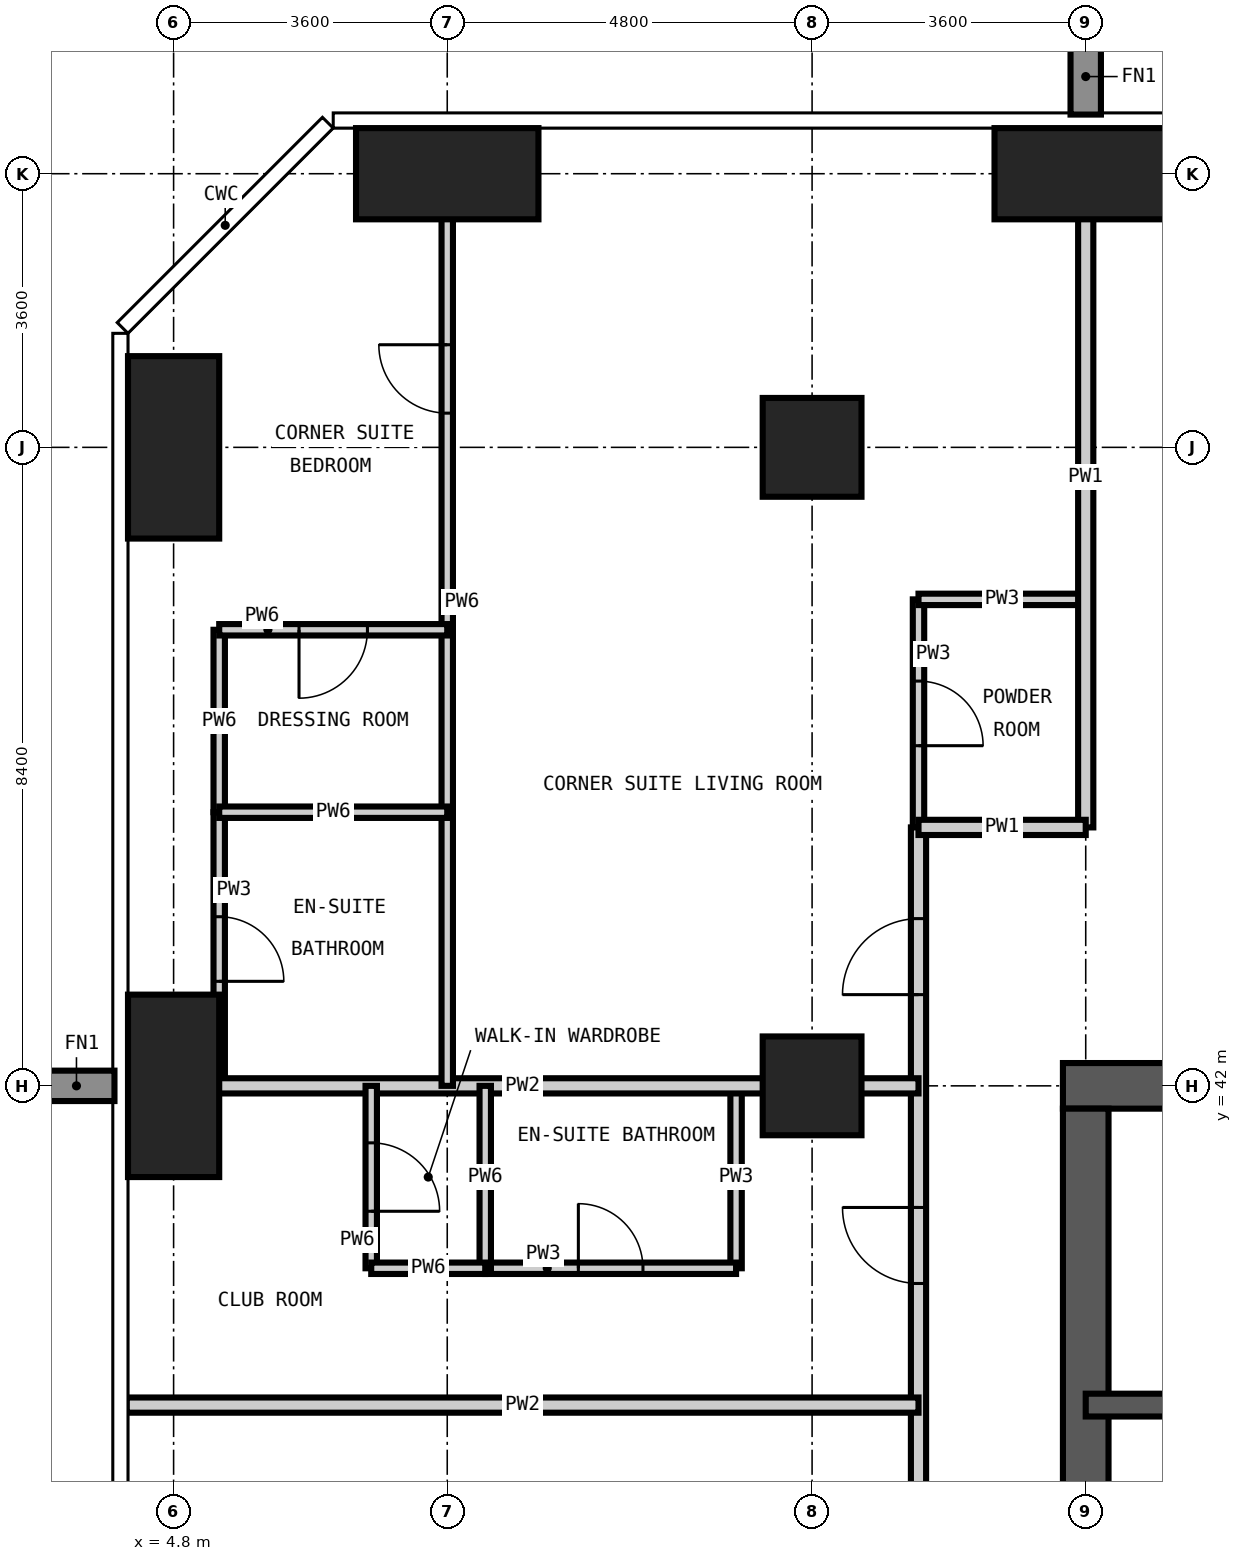
"""IFC4 building model, lengths in metres.
Left out: names, types, materials, properties, quantities, classifications, styles, units other than length and angle.
Written with IfcOpenShell. Run it as: python <this file> out.ifc"""

import sys

from ifc_helpers import new_model, si_unit, direction, frame, frame_2d, origin, origin_2d, place, context, subcontext, project, spatial, rectangle, extrude, element, fill, save


model = new_model("IFC4")
c1 = context("Model", 3, precision=1e-05, world=origin(), true_north=direction((0.0, 1.0)))
c2 = subcontext(c1, "Body", "Model", "MODEL_VIEW")
j1 = project(units=[si_unit("LENGTHUNIT", "METRE"), si_unit("PLANEANGLEUNIT", "RADIAN")], contexts=[c1])
p1 = place(None, origin())
s1 = spatial("IfcSite", under=j1, at=p1, CompositionType="ELEMENT")
p2 = place(p1, origin())
s2 = spatial("IfcBuilding", under=s1, at=p2, CompositionType="ELEMENT")
p3 = place(p2, frame((0.0, 0.0, 180.6)))
s3 = spatial("IfcBuildingStorey", under=s2, at=p3, CompositionType="ELEMENT", Elevation=180.6)
for number, where, z_axis, x_axis in (
    (1, (4.8, 42.0, -0.35), (0.0, 0.0, 1.0), (1.0, 0.0, 0.0)),
    (2, (4.8, 50.4, -0.35), (0.0, 0.0, 1.0), (1.0, 0.0, 0.0)),
):
    element("IfcColumn", number, at=place(p3, frame(where, z_axis=z_axis, x_axis=x_axis)), inside=s3, PredefinedType="COLUMN", context=c2, shape_type="SweptSolid", body=[
        extrude(rectangle(XDim=1.2, YDim=2.4, at=origin_2d()), origin(), (0.0, 0.0, 1.0), 3.6),
    ])
p4 = place(p3, frame((8.4, 54.0, -0.35), z_axis=(0.0, 0.0, 1.0), x_axis=(1.0, 0.0, 0.0)))
e3 = element("IfcColumn", 3, at=p4, inside=s3, PredefinedType="COLUMN", context=c2, shape_type="SweptSolid", body=[
    extrude(rectangle(XDim=2.4, YDim=1.2, at=origin_2d()), origin(), (0.0, 0.0, 1.0), 3.6),
])
for number, where, z_axis, x_axis in (
    (4, (13.2, 42.0, -0.35), (0.0, 0.0, 1.0), (1.0, 0.0, 0.0)),
    (5, (13.2, 50.4, -0.35), (0.0, 0.0, 1.0), (1.0, 0.0, 0.0)),
):
    element("IfcColumn", number, at=place(p3, frame(where, z_axis=z_axis, x_axis=x_axis)), inside=s3, PredefinedType="COLUMN", context=c2, shape_type="SweptSolid", body=[
        extrude(rectangle(XDim=1.3, YDim=1.3, at=origin_2d()), origin(), (0.0, 0.0, 1.0), 3.6),
    ])
p5 = place(p3, frame((16.8, 54.0, -0.35), z_axis=(0.0, 0.0, 1.0), x_axis=(1.0, 0.0, 0.0)))
e6 = element("IfcColumn", 6, at=p5, inside=s3, PredefinedType="COLUMN", context=c2, shape_type="SweptSolid", body=[
    extrude(rectangle(XDim=2.4, YDim=1.2, at=origin_2d()), origin(), (0.0, 0.0, 1.0), 3.6),
])
p6 = place(p3, frame((42.3, 42.0, -0.35), z_axis=(0.0, 0.0, 1.0), x_axis=(-1.0, 0.0, 0.0)))
e7 = element("IfcWall", 7, at=p6, inside=s3, PredefinedType="SHEAR", context=c2, shape_type="SweptSolid", body=[
    extrude(rectangle(XDim=25.8, YDim=0.6, at=frame_2d((12.9, 0.0))), origin(), (0.0, 0.0, 1.0), 3.6),
])
p7 = place(p6, frame((20.8, 0.0, 0.35)))
e8 = element("IfcOpeningElement", 8, at=p7, cuts=e7, PredefinedType="OPENING", context=c2, shape_type="SweptSolid", body=[
    extrude(rectangle(XDim=1.0, YDim=2.1, at=frame_2d((0.5, 1.05))), frame((0.0, 0.31, 0.0), z_axis=(0.0, -1.0, 0.0), x_axis=(1.0, 0.0, 0.0)), (0.0, 0.0, 1.0), 0.62),
])
p8 = place(p6, frame((10.2, 0.0, 0.35)))
e9 = element("IfcOpeningElement", 9, at=p8, cuts=e7, PredefinedType="OPENING", context=c2, shape_type="SweptSolid", body=[
    extrude(rectangle(XDim=1.2, YDim=2.2, at=frame_2d((0.6, 1.1))), frame((0.0, 0.31, 0.0), z_axis=(0.0, -1.0, 0.0), x_axis=(1.0, 0.0, 0.0)), (0.0, 0.0, 1.0), 0.62),
])
p9 = place(p3, frame((16.8, 41.7, -0.35), z_axis=(0.0, 0.0, 1.0), x_axis=(0.0, -1.0, 0.0)))
e10 = element("IfcWall", 10, at=p9, inside=s3, PredefinedType="SHEAR", context=c2, shape_type="SweptSolid", body=[
    extrude(rectangle(XDim=24.6, YDim=0.6, at=frame_2d((12.3, 0.0))), origin(), (0.0, 0.0, 1.0), 3.6),
])
p10 = place(p9, frame((11.4, 0.0, 0.35)))
e11 = element("IfcOpeningElement", 11, at=p10, cuts=e10, PredefinedType="OPENING", context=c2, shape_type="SweptSolid", body=[
    extrude(rectangle(XDim=1.8, YDim=2.2, at=frame_2d((0.9, 1.1))), frame((0.0, 0.31, 0.0), z_axis=(0.0, -1.0, 0.0), x_axis=(1.0, 0.0, 0.0)), (0.0, 0.0, 1.0), 0.62),
])
p11 = place(p9, frame((20.2, 0.0, 0.35)))
e12 = element("IfcOpeningElement", 12, at=p11, cuts=e10, PredefinedType="OPENING", context=c2, shape_type="SweptSolid", body=[
    extrude(rectangle(XDim=1.0, YDim=2.1, at=frame_2d((0.5, 1.05))), frame((0.0, 0.31, 0.0), z_axis=(0.0, -1.0, 0.0), x_axis=(1.0, 0.0, 0.0)), (0.0, 0.0, 1.0), 0.62),
])
p12 = place(p9, frame((5.5, 0.0, 0.35)))
e13 = element("IfcOpeningElement", 13, at=p12, cuts=e10, PredefinedType="OPENING", context=c2, shape_type="SweptSolid", body=[
    extrude(rectangle(XDim=1.0, YDim=2.1, at=frame_2d((0.5, 1.05))), frame((0.0, 0.31, 0.0), z_axis=(0.0, -1.0, 0.0), x_axis=(1.0, 0.0, 0.0)), (0.0, 0.0, 1.0), 0.62),
])
p13 = place(p3, frame((16.8, 37.8, -0.35), z_axis=(0.0, 0.0, 1.0), x_axis=(1.0, 0.0, 0.0)))
e14 = element("IfcWall", 14, at=p13, inside=s3, PredefinedType="SHEAR", context=c2, shape_type="SweptSolid", body=[
    extrude(rectangle(XDim=8.4, YDim=0.3, at=frame_2d((4.2, 0.0))), origin(), (0.0, 0.0, 1.0), 3.6),
])
p14 = place(p3, frame((5.4, 42.0, 0.0), z_axis=(0.0, 0.0, 1.0), x_axis=(0.0, 1.0, 0.0)))
e15 = element("IfcWall", 15, at=p14, inside=s3, PredefinedType="PARTITIONING", context=c2, shape_type="SweptSolid", body=[
    extrude(rectangle(XDim=3.6, YDim=0.15, at=frame_2d((1.8, 0.0))), origin(), (0.0, 0.0, 1.0), 3.25),
])
p15 = place(p14, frame((1.375, 0.0, 0.0)))
e16 = element("IfcOpeningElement", 16, at=p15, cuts=e15, PredefinedType="OPENING", context=c2, shape_type="SweptSolid", body=[
    extrude(rectangle(XDim=0.85, YDim=2.1, at=frame_2d((0.425, 1.05))), frame((0.0, 0.085, 0.0), z_axis=(0.0, -1.0, 0.0), x_axis=(1.0, 0.0, 0.0)), (0.0, 0.0, 1.0), 0.17),
])
p16 = place(p3, frame((12.2, 39.6, 0.0), z_axis=(0.0, 0.0, 1.0), x_axis=(0.0, 1.0, 0.0)))
e17 = element("IfcWall", 17, at=p16, inside=s3, PredefinedType="PARTITIONING", context=c2, shape_type="SweptSolid", body=[
    extrude(rectangle(XDim=2.4, YDim=0.15, at=frame_2d((1.2, 0.0))), origin(), (0.0, 0.0, 1.0), 3.25),
])
p17 = place(p3, frame((14.6, 45.4, 0.0), z_axis=(0.0, 0.0, 1.0), x_axis=(0.0, 1.0, 0.0)))
e18 = element("IfcWall", 18, at=p17, inside=s3, PredefinedType="PARTITIONING", context=c2, shape_type="SweptSolid", body=[
    extrude(rectangle(XDim=3.0, YDim=0.15, at=frame_2d((1.5, 0.0))), origin(), (0.0, 0.0, 1.0), 3.25),
])
p18 = place(p17, frame((1.075, 0.0, 0.0)))
e19 = element("IfcOpeningElement", 19, at=p18, cuts=e18, PredefinedType="OPENING", context=c2, shape_type="SweptSolid", body=[
    extrude(rectangle(XDim=0.85, YDim=2.1, at=frame_2d((0.425, 1.05))), frame((0.0, 0.085, 0.0), z_axis=(0.0, -1.0, 0.0), x_axis=(1.0, 0.0, 0.0)), (0.0, 0.0, 1.0), 0.17),
])
p19 = place(p3, frame((8.9, 39.6, 0.0), z_axis=(0.0, 0.0, 1.0), x_axis=(1.0, 0.0, 0.0)))
e20 = element("IfcWall", 20, at=p19, inside=s3, PredefinedType="PARTITIONING", context=c2, shape_type="SweptSolid", body=[
    extrude(rectangle(XDim=3.3, YDim=0.15, at=frame_2d((1.65, 0.0))), origin(), (0.0, 0.0, 1.0), 3.25),
])
p20 = place(p19, frame((1.225, 0.0, 0.0)))
e21 = element("IfcOpeningElement", 21, at=p20, cuts=e20, PredefinedType="OPENING", context=c2, shape_type="SweptSolid", body=[
    extrude(rectangle(XDim=0.85, YDim=2.1, at=frame_2d((0.425, 1.05))), frame((0.0, 0.085, 0.0), z_axis=(0.0, -1.0, 0.0), x_axis=(1.0, 0.0, 0.0)), (0.0, 0.0, 1.0), 0.17),
])
p21 = place(p3, frame((14.6, 48.4, 0.0), z_axis=(0.0, 0.0, 1.0), x_axis=(1.0, 0.0, 0.0)))
e22 = element("IfcWall", 22, at=p21, inside=s3, PredefinedType="PARTITIONING", context=c2, shape_type="SweptSolid", body=[
    extrude(rectangle(XDim=2.2, YDim=0.15, at=frame_2d((1.1, 0.0))), origin(), (0.0, 0.0, 1.0), 3.25),
])
p22 = place(p3, frame((14.6, 14.6, 0.0), z_axis=(0.0, 0.0, 1.0), x_axis=(0.0, 1.0, 0.0)))
e23 = element("IfcWall", 23, at=p22, inside=s3, PredefinedType="PARTITIONING", context=c2, shape_type="SweptSolid", body=[
    extrude(rectangle(XDim=30.8, YDim=0.2, at=frame_2d((15.4, 0.0))), origin(), (0.0, 0.0, 1.0), 3.25),
])
p23 = place(p22, frame((5.9, 0.0, 0.0)))
e24 = element("IfcOpeningElement", 24, at=p23, cuts=e23, PredefinedType="OPENING", context=c2, shape_type="SweptSolid", body=[
    extrude(rectangle(XDim=1.0, YDim=2.2, at=frame_2d((0.5, 1.1))), frame((0.0, 0.11, 0.0), z_axis=(0.0, -1.0, 0.0), x_axis=(1.0, 0.0, 0.0)), (0.0, 0.0, 1.0), 0.22),
])
p24 = place(p22, frame((11.8, 0.0, 0.0)))
e25 = element("IfcOpeningElement", 25, at=p24, cuts=e23, PredefinedType="OPENING", context=c2, shape_type="SweptSolid", body=[
    extrude(rectangle(XDim=1.8, YDim=2.4, at=frame_2d((0.9, 1.2))), frame((0.0, 0.11, 0.0), z_axis=(0.0, -1.0, 0.0), x_axis=(1.0, 0.0, 0.0)), (0.0, 0.0, 1.0), 0.22),
])
p25 = place(p22, frame((19.425, 0.0, 0.0)))
e26 = element("IfcOpeningElement", 26, at=p25, cuts=e23, PredefinedType="OPENING", context=c2, shape_type="SweptSolid", body=[
    extrude(rectangle(XDim=1.0, YDim=2.2, at=frame_2d((0.5, 1.1))), frame((0.0, 0.11, 0.0), z_axis=(0.0, -1.0, 0.0), x_axis=(1.0, 0.0, 0.0)), (0.0, 0.0, 1.0), 0.22),
])
p26 = place(p22, frame((24.8, 0.0, 0.0)))
e27 = element("IfcOpeningElement", 27, at=p26, cuts=e23, PredefinedType="OPENING", context=c2, shape_type="SweptSolid", body=[
    extrude(rectangle(XDim=1.0, YDim=2.2, at=frame_2d((0.5, 1.1))), frame((0.0, 0.11, 0.0), z_axis=(0.0, -1.0, 0.0), x_axis=(1.0, 0.0, 0.0)), (0.0, 0.0, 1.0), 0.22),
])
p27 = place(p22, frame((0.6, 0.0, 0.0)))
e28 = element("IfcOpeningElement", 28, at=p27, cuts=e23, PredefinedType="OPENING", context=c2, shape_type="SweptSolid", body=[
    extrude(rectangle(XDim=1.0, YDim=2.2, at=frame_2d((0.5, 1.1))), frame((0.0, 0.11, 0.0), z_axis=(0.0, -1.0, 0.0), x_axis=(1.0, 0.0, 0.0)), (0.0, 0.0, 1.0), 0.22),
])
p28 = place(p22, frame((28.6, 0.0, 0.0)))
e29 = element("IfcOpeningElement", 29, at=p28, cuts=e23, PredefinedType="OPENING", context=c2, shape_type="SweptSolid", body=[
    extrude(rectangle(XDim=1.0, YDim=2.2, at=frame_2d((0.5, 1.1))), frame((0.0, 0.11, 0.0), z_axis=(0.0, -1.0, 0.0), x_axis=(1.0, 0.0, 0.0)), (0.0, 0.0, 1.0), 0.22),
])
p29 = place(p3, frame((16.8, 45.4, 0.0), z_axis=(0.0, 0.0, 1.0), x_axis=(0.0, 1.0, 0.0)))
e30 = element("IfcWall", 30, at=p29, inside=s3, PredefinedType="PARTITIONING", context=c2, shape_type="SweptSolid", body=[
    extrude(rectangle(XDim=9.218, YDim=0.2, at=frame_2d((4.609, 0.0))), origin(), (0.0, 0.0, 1.0), 3.25),
])
p30 = place(p3, frame((14.6, 45.4, 0.0), z_axis=(0.0, 0.0, 1.0), x_axis=(1.0, 0.0, 0.0)))
e31 = element("IfcWall", 31, at=p30, inside=s3, PredefinedType="PARTITIONING", context=c2, shape_type="SweptSolid", body=[
    extrude(rectangle(XDim=2.2, YDim=0.2, at=frame_2d((1.1, 0.0))), origin(), (0.0, 0.0, 1.0), 3.25),
])
for number, where, z_axis, x_axis in (
    (32, (4.182, 37.8, 0.0), (0.0, 0.0, 1.0), (1.0, 0.0, 0.0)),
    (33, (4.182, 42.0, 0.0), (0.0, 0.0, 1.0), (1.0, 0.0, 0.0)),
):
    element("IfcWall", number, at=place(p3, frame(where, z_axis=z_axis, x_axis=x_axis)), inside=s3, PredefinedType="PARTITIONING", context=c2, shape_type="SweptSolid", body=[
        extrude(rectangle(XDim=10.418, YDim=0.2, at=frame_2d((5.209, 0.0))), origin(), (0.0, 0.0, 1.0), 3.25),
    ])
p31 = place(p3, frame((5.4, 45.6, 0.0), z_axis=(0.0, 0.0, 1.0), x_axis=(0.0, 1.0, 0.0)))
e34 = element("IfcWall", 34, at=p31, inside=s3, PredefinedType="PARTITIONING", context=c2, shape_type="SweptSolid", body=[
    extrude(rectangle(XDim=2.4, YDim=0.15, at=frame_2d((1.2, 0.0))), origin(), (0.0, 0.0, 1.0), 3.25),
])
p32 = place(p3, frame((7.4, 39.6, 0.0), z_axis=(0.0, 0.0, 1.0), x_axis=(0.0, 1.0, 0.0)))
e35 = element("IfcWall", 35, at=p32, inside=s3, PredefinedType="PARTITIONING", context=c2, shape_type="SweptSolid", body=[
    extrude(rectangle(XDim=2.4, YDim=0.15, at=frame_2d((1.2, 0.0))), origin(), (0.0, 0.0, 1.0), 3.25),
])
p33 = place(p32, frame((0.75, 0.0, 0.0)))
e36 = element("IfcOpeningElement", 36, at=p33, cuts=e35, PredefinedType="OPENING", context=c2, shape_type="SweptSolid", body=[
    extrude(rectangle(XDim=0.9, YDim=2.1, at=frame_2d((0.45, 1.05))), frame((0.0, 0.085, 0.0), z_axis=(0.0, -1.0, 0.0), x_axis=(1.0, 0.0, 0.0)), (0.0, 0.0, 1.0), 0.17),
])
p34 = place(p3, frame((8.4, 42.0, 0.0), z_axis=(0.0, 0.0, 1.0), x_axis=(0.0, 1.0, 0.0)))
e37 = element("IfcWall", 37, at=p34, inside=s3, PredefinedType="PARTITIONING", context=c2, shape_type="SweptSolid", body=[
    extrude(rectangle(XDim=12.618, YDim=0.15, at=frame_2d((6.309, 0.0))), origin(), (0.0, 0.0, 1.0), 3.25),
])
p35 = place(p34, frame((8.85, 0.0, 0.0)))
e38 = element("IfcOpeningElement", 38, at=p35, cuts=e37, PredefinedType="OPENING", context=c2, shape_type="SweptSolid", body=[
    extrude(rectangle(XDim=0.9, YDim=2.1, at=frame_2d((0.45, 1.05))), frame((0.0, 0.085, 0.0), z_axis=(0.0, -1.0, 0.0), x_axis=(1.0, 0.0, 0.0)), (0.0, 0.0, 1.0), 0.17),
])
p36 = place(p3, frame((8.9, 39.6, 0.0), z_axis=(0.0, 0.0, 1.0), x_axis=(0.0, 1.0, 0.0)))
e39 = element("IfcWall", 39, at=p36, inside=s3, PredefinedType="PARTITIONING", context=c2, shape_type="SweptSolid", body=[
    extrude(rectangle(XDim=2.4, YDim=0.15, at=frame_2d((1.2, 0.0))), origin(), (0.0, 0.0, 1.0), 3.25),
])
p37 = place(p3, frame((7.4, 39.6, 0.0), z_axis=(0.0, 0.0, 1.0), x_axis=(1.0, 0.0, 0.0)))
e40 = element("IfcWall", 40, at=p37, inside=s3, PredefinedType="PARTITIONING", context=c2, shape_type="SweptSolid", body=[
    extrude(rectangle(XDim=1.5, YDim=0.15, at=frame_2d((0.75, 0.0))), origin(), (0.0, 0.0, 1.0), 3.25),
])
p38 = place(p3, frame((5.4, 45.6, 0.0), z_axis=(0.0, 0.0, 1.0), x_axis=(1.0, 0.0, 0.0)))
e41 = element("IfcWall", 41, at=p38, inside=s3, PredefinedType="PARTITIONING", context=c2, shape_type="SweptSolid", body=[
    extrude(rectangle(XDim=3.0, YDim=0.15, at=frame_2d((1.5, 0.0))), origin(), (0.0, 0.0, 1.0), 3.25),
])
p39 = place(p3, frame((5.4, 48.0, 0.0), z_axis=(0.0, 0.0, 1.0), x_axis=(1.0, 0.0, 0.0)))
e42 = element("IfcWall", 42, at=p39, inside=s3, PredefinedType="PARTITIONING", context=c2, shape_type="SweptSolid", body=[
    extrude(rectangle(XDim=3.0, YDim=0.15, at=frame_2d((1.5, 0.0))), origin(), (0.0, 0.0, 1.0), 3.25),
])
p40 = place(p39, frame((1.05, 0.0, 0.0)))
e43 = element("IfcOpeningElement", 43, at=p40, cuts=e42, PredefinedType="OPENING", context=c2, shape_type="SweptSolid", body=[
    extrude(rectangle(XDim=0.9, YDim=2.1, at=frame_2d((0.45, 1.05))), frame((0.0, 0.085, 0.0), z_axis=(0.0, -1.0, 0.0), x_axis=(1.0, 0.0, 0.0)), (0.0, 0.0, 1.0), 0.17),
])
p41 = place(p26, origin())
e44 = element("IfcDoor", 44, at=p41, inside=s3, OperationType="SINGLE_SWING_RIGHT", PredefinedType="DOOR", context=c2, shape_type="SweptSolid", body=[
    extrude(rectangle(XDim=1.0, YDim=2.2, at=frame_2d((0.5, 1.1))), frame((0.0, 0.025, 0.0), z_axis=(0.0, -1.0, 0.0), x_axis=(1.0, 0.0, 0.0)), (0.0, 0.0, 1.0), 0.05),
])
fill(e27, e44)
p42 = place(p20, origin())
e45 = element("IfcDoor", 45, at=p42, inside=s3, OperationType="SINGLE_SWING_LEFT", PredefinedType="DOOR", context=c2, shape_type="SweptSolid", body=[
    extrude(rectangle(XDim=0.85, YDim=2.1, at=frame_2d((0.425, 1.05))), frame((0.0, 0.025, 0.0), z_axis=(0.0, -1.0, 0.0), x_axis=(1.0, 0.0, 0.0)), (0.0, 0.0, 1.0), 0.05),
])
fill(e21, e45)
p43 = place(p33, frame((0.9, 0.0, 0.0), z_axis=(0.0, 0.0, 1.0), x_axis=(-1.0, 0.0, 0.0)))
e46 = element("IfcDoor", 46, at=p43, inside=s3, OperationType="SINGLE_SWING_RIGHT", PredefinedType="DOOR", context=c2, shape_type="SweptSolid", body=[
    extrude(rectangle(XDim=0.9, YDim=2.1, at=frame_2d((0.45, 1.05))), frame((0.0, 0.025, 0.0), z_axis=(0.0, -1.0, 0.0), x_axis=(1.0, 0.0, 0.0)), (0.0, 0.0, 1.0), 0.05),
])
fill(e36, e46)
p44 = place(p28, origin())
e47 = element("IfcDoor", 47, at=p44, inside=s3, OperationType="SINGLE_SWING_LEFT", PredefinedType="DOOR", context=c2, shape_type="SweptSolid", body=[
    extrude(rectangle(XDim=1.0, YDim=2.2, at=frame_2d((0.5, 1.1))), frame((0.0, 0.025, 0.0), z_axis=(0.0, -1.0, 0.0), x_axis=(1.0, 0.0, 0.0)), (0.0, 0.0, 1.0), 0.05),
])
fill(e29, e47)
p45 = place(p18, frame((0.85, 0.0, 0.0), z_axis=(0.0, 0.0, 1.0), x_axis=(-1.0, 0.0, 0.0)))
e48 = element("IfcDoor", 48, at=p45, inside=s3, OperationType="SINGLE_SWING_RIGHT", PredefinedType="DOOR", context=c2, shape_type="SweptSolid", body=[
    extrude(rectangle(XDim=0.85, YDim=2.1, at=frame_2d((0.425, 1.05))), frame((0.0, 0.025, 0.0), z_axis=(0.0, -1.0, 0.0), x_axis=(1.0, 0.0, 0.0)), (0.0, 0.0, 1.0), 0.05),
])
fill(e19, e48)
p46 = place(p35, origin())
e49 = element("IfcDoor", 49, at=p46, inside=s3, OperationType="SINGLE_SWING_RIGHT", PredefinedType="DOOR", context=c2, shape_type="SweptSolid", body=[
    extrude(rectangle(XDim=0.9, YDim=2.1, at=frame_2d((0.45, 1.05))), frame((0.0, 0.025, 0.0), z_axis=(0.0, -1.0, 0.0), x_axis=(1.0, 0.0, 0.0)), (0.0, 0.0, 1.0), 0.05),
])
fill(e38, e49)
p47 = place(p15, frame((0.85, 0.0, 0.0), z_axis=(0.0, 0.0, 1.0), x_axis=(-1.0, 0.0, 0.0)))
e50 = element("IfcDoor", 50, at=p47, inside=s3, OperationType="SINGLE_SWING_RIGHT", PredefinedType="DOOR", context=c2, shape_type="SweptSolid", body=[
    extrude(rectangle(XDim=0.85, YDim=2.1, at=frame_2d((0.425, 1.05))), frame((0.0, 0.025, 0.0), z_axis=(0.0, -1.0, 0.0), x_axis=(1.0, 0.0, 0.0)), (0.0, 0.0, 1.0), 0.05),
])
fill(e16, e50)
p48 = place(p40, frame((0.9, 0.0, 0.0), z_axis=(0.0, 0.0, 1.0), x_axis=(-1.0, 0.0, 0.0)))
e51 = element("IfcDoor", 51, at=p48, inside=s3, OperationType="SINGLE_SWING_RIGHT", PredefinedType="DOOR", context=c2, shape_type="SweptSolid", body=[
    extrude(rectangle(XDim=0.9, YDim=2.1, at=frame_2d((0.45, 1.05))), frame((0.0, 0.025, 0.0), z_axis=(0.0, -1.0, 0.0), x_axis=(1.0, 0.0, 0.0)), (0.0, 0.0, 1.0), 0.05),
])
fill(e43, e51)
save(model, sys.argv[1])
